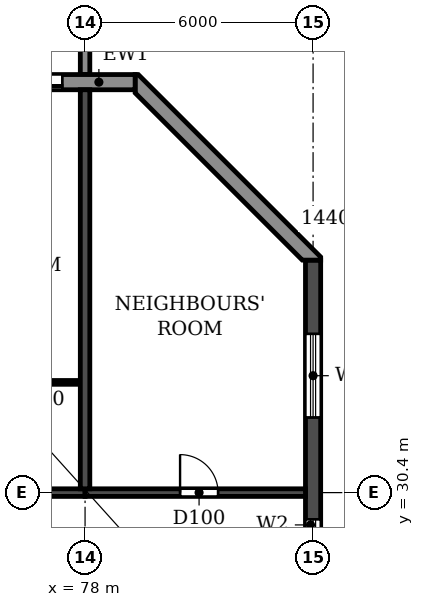
"""IFC4 building model, lengths in metres.
Left out: names, types, materials, properties, quantities, classifications, styles, units other than length and angle.
Written with IfcOpenShell. Run it as: python <this file> out.ifc"""

import sys

from ifc_helpers import new_model, si_unit, direction, frame, frame_2d, origin, place, context, subcontext, project, spatial, polyline, rectangle, outline, extrude, source, transform, mapped, element, fill, save


model = new_model("IFC4")
c1 = context("Model", 3, precision=1e-05, world=origin(), true_north=direction((0.0, 1.0)))
c2 = subcontext(c1, "Body", "Model", "MODEL_VIEW")
j1 = project(units=[si_unit("LENGTHUNIT", "METRE"), si_unit("PLANEANGLEUNIT", "RADIAN")], contexts=[c1])
p1 = place(None, origin())
s1 = spatial("IfcSite", under=j1, at=p1, CompositionType="ELEMENT")
p2 = place(p1, origin())
s2 = spatial("IfcBuilding", under=s1, at=p2, CompositionType="ELEMENT")
p3 = place(p2, frame((0.0, 0.0, 251.1)))
s3 = spatial("IfcBuildingStorey", under=s2, at=p3, CompositionType="ELEMENT", Elevation=251.1)
p4 = place(p3, frame((78.0, 30.5, 0.0), z_axis=(0.0, 0.0, 1.0), x_axis=(0.0, 1.0, 0.0)))
e1 = element("IfcWall", 1, at=p4, inside=s3, PredefinedType="SHEAR", context=c2, shape_type="SweptSolid", body=[
    extrude(rectangle(XDim=10.5, YDim=0.25, at=frame_2d((5.25, 0.0))), origin(), (0.0, 0.0, 1.0), 3.08),
])
p5 = place(p3, frame((84.0, 4.683, 0.0), z_axis=(0.0, 0.0, 1.0), x_axis=(0.0, 1.0, 0.0)))
e2 = element("IfcWall", 2, at=p5, inside=s3, PredefinedType="SHEAR", context=c2, shape_type="SweptSolid", body=[
    extrude(rectangle(XDim=31.834, YDim=0.4, at=frame_2d((15.917, 0.0))), origin(), (0.0, 0.0, 1.0), 3.08),
])
p6 = place(p5, frame((23.817, 0.0, 0.9)))
e3 = element("IfcOpeningElement", 3, at=p6, cuts=e2, PredefinedType="OPENING", context=c2, shape_type="SweptSolid", body=[
    extrude(rectangle(XDim=1.2, YDim=1.5, at=frame_2d((0.6, 0.75))), frame((0.0, 0.21, 0.0), z_axis=(0.0, -1.0, 0.0), x_axis=(1.0, 0.0, 0.0)), (0.0, 0.0, 1.0), 0.42),
])
p7 = place(p5, frame((8.017, 0.0, 0.9)))
e4 = element("IfcOpeningElement", 4, at=p7, cuts=e2, PredefinedType="OPENING", context=c2, shape_type="SweptSolid", body=[
    extrude(rectangle(XDim=1.2, YDim=1.5, at=frame_2d((0.6, 0.75))), frame((0.0, 0.21, 0.0), z_axis=(0.0, -1.0, 0.0), x_axis=(1.0, 0.0, 0.0)), (0.0, 0.0, 1.0), 0.42),
])
p8 = place(p5, frame((27.694, 0.0, 0.6)))
e5 = element("IfcOpeningElement", 5, at=p8, cuts=e2, PredefinedType="OPENING", context=c2, shape_type="SweptSolid", body=[
    extrude(rectangle(XDim=2.2, YDim=1.8, at=frame_2d((1.1, 0.9))), frame((0.0, 0.21, 0.0), z_axis=(0.0, -1.0, 0.0), x_axis=(1.0, 0.0, 0.0)), (0.0, 0.0, 1.0), 0.42),
])
p9 = place(p5, frame((2.541, 0.0, 0.6)))
e6 = element("IfcOpeningElement", 6, at=p9, cuts=e2, PredefinedType="OPENING", context=c2, shape_type="SweptSolid", body=[
    extrude(rectangle(XDim=2.2, YDim=1.8, at=frame_2d((1.1, 0.9))), frame((0.0, 0.21, 0.0), z_axis=(0.0, -1.0, 0.0), x_axis=(1.0, 0.0, 0.0)), (0.0, 0.0, 1.0), 0.42),
])
p10 = place(p5, frame((15.917, 0.0, 0.9)))
e7 = element("IfcOpeningElement", 7, at=p10, cuts=e2, PredefinedType="OPENING", context=c2, shape_type="SweptSolid", body=[
    extrude(rectangle(XDim=1.2, YDim=1.5, at=frame_2d((0.6, 0.75))), frame((0.0, 0.21, 0.0), z_axis=(0.0, -1.0, 0.0), x_axis=(1.0, 0.0, 0.0)), (0.0, 0.0, 1.0), 0.42),
])
p11 = place(p3, frame((72.0, 30.4, 0.0), z_axis=(0.0, 0.0, 1.0), x_axis=(1.0, 0.0, 0.0)))
e8 = element("IfcWall", 8, at=p11, inside=s3, PredefinedType="SHEAR", context=c2, shape_type="SweptSolid", body=[
    extrude(rectangle(XDim=6.0, YDim=0.2, at=frame_2d((3.0, 0.0))), origin(), (0.0, 0.0, 1.0), 2.48),
])
p12 = place(p11, frame((2.55, 0.0, 0.0)))
e9 = element("IfcOpeningElement", 9, at=p12, cuts=e8, PredefinedType="OPENING", context=c2, shape_type="SweptSolid", body=[
    extrude(rectangle(XDim=1.0, YDim=2.1, at=frame_2d((0.5, 1.05))), frame((0.0, 0.11, 0.0), z_axis=(0.0, -1.0, 0.0), x_axis=(1.0, 0.0, 0.0)), (0.0, 0.0, 1.0), 0.22),
])
p13 = place(p3, frame((78.0, 30.4, 0.0), z_axis=(0.0, 0.0, 1.0), x_axis=(1.0, 0.0, 0.0)))
e10 = element("IfcWall", 10, at=p13, inside=s3, PredefinedType="SHEAR", context=c2, shape_type="SweptSolid", body=[
    extrude(rectangle(XDim=5.8, YDim=0.2, at=frame_2d((2.9, 0.0))), origin(), (0.0, 0.0, 1.0), 2.48),
])
p14 = place(p13, frame((2.5, 0.0, 0.0)))
e11 = element("IfcOpeningElement", 11, at=p14, cuts=e10, PredefinedType="OPENING", context=c2, shape_type="SweptSolid", body=[
    extrude(rectangle(XDim=1.0, YDim=2.1, at=frame_2d((0.5, 1.05))), frame((0.0, 0.11, 0.0), z_axis=(0.0, -1.0, 0.0), x_axis=(1.0, 0.0, 0.0)), (0.0, 0.0, 1.0), 0.22),
])
p15 = place(p3, origin())
e12 = element("IfcWall", 12, at=p15, inside=s3, PredefinedType="STANDARD", context=c2, shape_type="SweptSolid", body=[
    extrude(outline(polyline([(84.2, 36.517), (84.2, 36.6), (79.4, 41.4), (79.317, 41.4), (79.317, 40.917), (83.717, 36.517), (84.2, 36.517)])), origin(), (0.0, 0.0, 1.0), 3.08),
])
p16 = place(p3, frame((79.317, 41.2, 0.0), z_axis=(0.0, 0.0, 1.0), x_axis=(-1.0, 0.0, 0.0)))
e13 = element("IfcWall", 13, at=p16, inside=s3, PredefinedType="STANDARD", context=c2, shape_type="SweptSolid", body=[
    extrude(rectangle(XDim=56.634, YDim=0.4, at=frame_2d((28.317, 0.0))), origin(), (0.0, 0.0, 1.0), 3.08),
])
p17 = place(p16, frame((52.717, 0.0, 0.9)))
e14 = element("IfcOpeningElement", 14, at=p17, cuts=e13, PredefinedType="OPENING", context=c2, shape_type="SweptSolid", body=[
    extrude(rectangle(XDim=2.2, YDim=1.5, at=frame_2d((1.1, 0.75))), frame((0.0, 0.21, 0.0), z_axis=(0.0, -1.0, 0.0), x_axis=(1.0, 0.0, 0.0)), (0.0, 0.0, 1.0), 0.42),
])
p18 = place(p16, frame((49.717, 0.0, 0.9)))
e15 = element("IfcOpeningElement", 15, at=p18, cuts=e13, PredefinedType="OPENING", context=c2, shape_type="SweptSolid", body=[
    extrude(rectangle(XDim=2.2, YDim=1.5, at=frame_2d((1.1, 0.75))), frame((0.0, 0.21, 0.0), z_axis=(0.0, -1.0, 0.0), x_axis=(1.0, 0.0, 0.0)), (0.0, 0.0, 1.0), 0.42),
])
p19 = place(p16, frame((46.717, 0.0, 0.9)))
e16 = element("IfcOpeningElement", 16, at=p19, cuts=e13, PredefinedType="OPENING", context=c2, shape_type="SweptSolid", body=[
    extrude(rectangle(XDim=2.2, YDim=1.5, at=frame_2d((1.1, 0.75))), frame((0.0, 0.21, 0.0), z_axis=(0.0, -1.0, 0.0), x_axis=(1.0, 0.0, 0.0)), (0.0, 0.0, 1.0), 0.42),
])
p20 = place(p16, frame((43.917, 0.0, 0.0)))
e17 = element("IfcOpeningElement", 17, at=p20, cuts=e13, PredefinedType="OPENING", context=c2, shape_type="SweptSolid", body=[
    extrude(rectangle(XDim=1.8, YDim=2.4, at=frame_2d((0.9, 1.2))), frame((0.0, 0.21, 0.0), z_axis=(0.0, -1.0, 0.0), x_axis=(1.0, 0.0, 0.0)), (0.0, 0.0, 1.0), 0.42),
])
p21 = place(p16, frame((40.717, 0.0, 0.9)))
e18 = element("IfcOpeningElement", 18, at=p21, cuts=e13, PredefinedType="OPENING", context=c2, shape_type="SweptSolid", body=[
    extrude(rectangle(XDim=2.2, YDim=1.5, at=frame_2d((1.1, 0.75))), frame((0.0, 0.21, 0.0), z_axis=(0.0, -1.0, 0.0), x_axis=(1.0, 0.0, 0.0)), (0.0, 0.0, 1.0), 0.42),
])
p22 = place(p16, frame((37.917, 0.0, 0.0)))
e19 = element("IfcOpeningElement", 19, at=p22, cuts=e13, PredefinedType="OPENING", context=c2, shape_type="SweptSolid", body=[
    extrude(rectangle(XDim=1.8, YDim=2.4, at=frame_2d((0.9, 1.2))), frame((0.0, 0.21, 0.0), z_axis=(0.0, -1.0, 0.0), x_axis=(1.0, 0.0, 0.0)), (0.0, 0.0, 1.0), 0.42),
])
p23 = place(p16, frame((34.717, 0.0, 0.9)))
e20 = element("IfcOpeningElement", 20, at=p23, cuts=e13, PredefinedType="OPENING", context=c2, shape_type="SweptSolid", body=[
    extrude(rectangle(XDim=2.2, YDim=1.5, at=frame_2d((1.1, 0.75))), frame((0.0, 0.21, 0.0), z_axis=(0.0, -1.0, 0.0), x_axis=(1.0, 0.0, 0.0)), (0.0, 0.0, 1.0), 0.42),
])
p24 = place(p16, frame((31.717, 0.0, 0.9)))
e21 = element("IfcOpeningElement", 21, at=p24, cuts=e13, PredefinedType="OPENING", context=c2, shape_type="SweptSolid", body=[
    extrude(rectangle(XDim=2.2, YDim=1.5, at=frame_2d((1.1, 0.75))), frame((0.0, 0.21, 0.0), z_axis=(0.0, -1.0, 0.0), x_axis=(1.0, 0.0, 0.0)), (0.0, 0.0, 1.0), 0.42),
])
p25 = place(p16, frame((28.717, 0.0, 0.9)))
e22 = element("IfcOpeningElement", 22, at=p25, cuts=e13, PredefinedType="OPENING", context=c2, shape_type="SweptSolid", body=[
    extrude(rectangle(XDim=2.2, YDim=1.5, at=frame_2d((1.1, 0.75))), frame((0.0, 0.21, 0.0), z_axis=(0.0, -1.0, 0.0), x_axis=(1.0, 0.0, 0.0)), (0.0, 0.0, 1.0), 0.42),
])
p26 = place(p16, frame((25.917, 0.0, 0.0)))
e23 = element("IfcOpeningElement", 23, at=p26, cuts=e13, PredefinedType="OPENING", context=c2, shape_type="SweptSolid", body=[
    extrude(rectangle(XDim=1.8, YDim=2.4, at=frame_2d((0.9, 1.2))), frame((0.0, 0.21, 0.0), z_axis=(0.0, -1.0, 0.0), x_axis=(1.0, 0.0, 0.0)), (0.0, 0.0, 1.0), 0.42),
])
p27 = place(p16, frame((22.917, 0.0, 0.0)))
e24 = element("IfcOpeningElement", 24, at=p27, cuts=e13, PredefinedType="OPENING", context=c2, shape_type="SweptSolid", body=[
    extrude(rectangle(XDim=1.8, YDim=2.4, at=frame_2d((0.9, 1.2))), frame((0.0, 0.21, 0.0), z_axis=(0.0, -1.0, 0.0), x_axis=(1.0, 0.0, 0.0)), (0.0, 0.0, 1.0), 0.42),
])
p28 = place(p16, frame((19.717, 0.0, 0.9)))
e25 = element("IfcOpeningElement", 25, at=p28, cuts=e13, PredefinedType="OPENING", context=c2, shape_type="SweptSolid", body=[
    extrude(rectangle(XDim=2.2, YDim=1.5, at=frame_2d((1.1, 0.75))), frame((0.0, 0.21, 0.0), z_axis=(0.0, -1.0, 0.0), x_axis=(1.0, 0.0, 0.0)), (0.0, 0.0, 1.0), 0.42),
])
p29 = place(p16, frame((16.717, 0.0, 0.9)))
e26 = element("IfcOpeningElement", 26, at=p29, cuts=e13, PredefinedType="OPENING", context=c2, shape_type="SweptSolid", body=[
    extrude(rectangle(XDim=2.2, YDim=1.5, at=frame_2d((1.1, 0.75))), frame((0.0, 0.21, 0.0), z_axis=(0.0, -1.0, 0.0), x_axis=(1.0, 0.0, 0.0)), (0.0, 0.0, 1.0), 0.42),
])
p30 = place(p16, frame((13.717, 0.0, 0.9)))
e27 = element("IfcOpeningElement", 27, at=p30, cuts=e13, PredefinedType="OPENING", context=c2, shape_type="SweptSolid", body=[
    extrude(rectangle(XDim=2.2, YDim=1.5, at=frame_2d((1.1, 0.75))), frame((0.0, 0.21, 0.0), z_axis=(0.0, -1.0, 0.0), x_axis=(1.0, 0.0, 0.0)), (0.0, 0.0, 1.0), 0.42),
])
p31 = place(p16, frame((10.717, 0.0, 0.9)))
e28 = element("IfcOpeningElement", 28, at=p31, cuts=e13, PredefinedType="OPENING", context=c2, shape_type="SweptSolid", body=[
    extrude(rectangle(XDim=2.2, YDim=1.5, at=frame_2d((1.1, 0.75))), frame((0.0, 0.21, 0.0), z_axis=(0.0, -1.0, 0.0), x_axis=(1.0, 0.0, 0.0)), (0.0, 0.0, 1.0), 0.42),
])
p32 = place(p16, frame((7.917, 0.0, 0.0)))
e29 = element("IfcOpeningElement", 29, at=p32, cuts=e13, PredefinedType="OPENING", context=c2, shape_type="SweptSolid", body=[
    extrude(rectangle(XDim=1.8, YDim=2.4, at=frame_2d((0.9, 1.2))), frame((0.0, 0.21, 0.0), z_axis=(0.0, -1.0, 0.0), x_axis=(1.0, 0.0, 0.0)), (0.0, 0.0, 1.0), 0.42),
])
p33 = place(p16, frame((4.717, 0.0, 0.9)))
e30 = element("IfcOpeningElement", 30, at=p33, cuts=e13, PredefinedType="OPENING", context=c2, shape_type="SweptSolid", body=[
    extrude(rectangle(XDim=2.2, YDim=1.5, at=frame_2d((1.1, 0.75))), frame((0.0, 0.21, 0.0), z_axis=(0.0, -1.0, 0.0), x_axis=(1.0, 0.0, 0.0)), (0.0, 0.0, 1.0), 0.42),
])
p34 = place(p16, frame((1.917, 0.0, 0.0)))
e31 = element("IfcOpeningElement", 31, at=p34, cuts=e13, PredefinedType="OPENING", context=c2, shape_type="SweptSolid", body=[
    extrude(rectangle(XDim=1.8, YDim=2.4, at=frame_2d((0.9, 1.2))), frame((0.0, 0.21, 0.0), z_axis=(0.0, -1.0, 0.0), x_axis=(1.0, 0.0, 0.0)), (0.0, 0.0, 1.0), 0.42),
])
m1 = source(origin(), c2, "Body", "SweptSolid", [
    extrude(outline(polyline([(0.0, 0.0), (0.25, 0.0), (0.25, 3.1), (0.0, 3.1), (0.0, 0.0)])), origin(), (0.0, 0.0, 1.0), 3.1),
])
p35 = place(p3, frame((77.875, 41.4, 0.0)))
e32 = element("IfcWall", 32, at=p35, inside=s3, PredefinedType="STANDARD", context=c2, shape_type="MappedRepresentation", body=[
    mapped(m1, transform((0.0, 0.0, 0.0))),
])
p36 = place(p3, frame((75.9, 33.3, 0.0), z_axis=(0.0, 0.0, 1.0), x_axis=(1.0, 0.0, 0.0)))
e33 = element("IfcWall", 33, at=p36, inside=s3, PredefinedType="PARTITIONING", context=c2, shape_type="SweptSolid", body=[
    extrude(rectangle(XDim=1.965, YDim=0.1, at=frame_2d((0.982, 0.0))), origin(), (0.0, 0.0, 1.0), 3.08),
])
p37 = place(p6, origin())
e34 = element("IfcWindow", 34, at=p37, inside=s3, PartitioningType="SINGLE_PANEL", PredefinedType="WINDOW", context=c2, shape_type="SweptSolid", body=[
    extrude(rectangle(XDim=1.2, YDim=1.5, at=frame_2d((0.6, 0.75))), frame((0.0, 0.03, 0.0), z_axis=(0.0, -1.0, 0.0), x_axis=(1.0, 0.0, 0.0)), (0.0, 0.0, 1.0), 0.06),
])
fill(e3, e34)
p38 = place(p8, origin())
e35 = element("IfcWindow", 35, at=p38, inside=s3, PartitioningType="DOUBLE_PANEL_HORIZONTAL", PredefinedType="WINDOW", context=c2, shape_type="SweptSolid", body=[
    extrude(rectangle(XDim=2.2, YDim=1.8, at=frame_2d((1.1, 0.9))), frame((0.0, 0.03, 0.0), z_axis=(0.0, -1.0, 0.0), x_axis=(1.0, 0.0, 0.0)), (0.0, 0.0, 1.0), 0.06),
])
fill(e5, e35)
p39 = place(p34, origin())
e36 = element("IfcDoor", 36, at=p39, inside=s3, OperationType="DOUBLE_DOOR_SLIDING", PredefinedType="DOOR", context=c2, shape_type="SweptSolid", body=[
    extrude(rectangle(XDim=1.8, YDim=2.4, at=frame_2d((0.9, 1.2))), frame((0.0, 0.025, 0.0), z_axis=(0.0, -1.0, 0.0), x_axis=(1.0, 0.0, 0.0)), (0.0, 0.0, 1.0), 0.05),
])
fill(e31, e36)
p40 = place(p14, origin())
e37 = element("IfcDoor", 37, at=p40, inside=s3, OperationType="SINGLE_SWING_LEFT", PredefinedType="DOOR", context=c2, shape_type="SweptSolid", body=[
    extrude(rectangle(XDim=1.0, YDim=2.1, at=frame_2d((0.5, 1.05))), frame((0.0, 0.025, 0.0), z_axis=(0.0, -1.0, 0.0), x_axis=(1.0, 0.0, 0.0)), (0.0, 0.0, 1.0), 0.05),
])
fill(e11, e37)
save(model, sys.argv[1])
